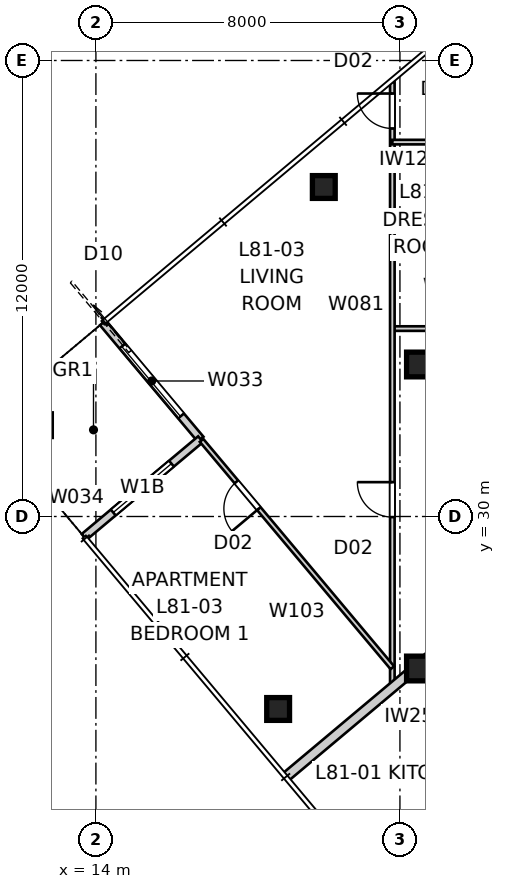
"""IFC4 building model, lengths in metres.
Left out: names, types, materials, properties, quantities, classifications, styles, units other than length and angle.
Written with IfcOpenShell. Run it as: python <this file> out.ifc"""

import sys

from ifc_helpers import new_model, si_unit, direction, frame, frame_2d, origin, origin_2d, place, context, subcontext, project, spatial, rectangle, extrude, element, fill, save


model = new_model("IFC4")
c1 = context("Model", 3, precision=1e-05, world=origin(), true_north=direction((0.0, 1.0)))
c2 = subcontext(c1, "Body", "Model", "MODEL_VIEW")
j1 = project(units=[si_unit("LENGTHUNIT", "METRE"), si_unit("PLANEANGLEUNIT", "RADIAN")], contexts=[c1])
p1 = place(None, origin())
s1 = spatial("IfcSite", under=j1, at=p1, CompositionType="ELEMENT")
p2 = place(p1, origin())
s2 = spatial("IfcBuilding", under=s1, at=p2, CompositionType="ELEMENT")
p3 = place(p2, frame((0.0, 0.0, 293.0)))
s3 = spatial("IfcBuildingStorey", under=s2, at=p3, CompositionType="ELEMENT", Elevation=293.0)
for number, where, z_axis, x_axis in (
    (1, (19.997, 38.671, 0.0), (0.0, 0.0, 1.0), (1.0, 0.0, 0.0)),
    (2, (18.795, 24.935, 0.0), (0.0, 0.0, 1.0), (1.0, 0.0, 0.0)),
):
    element("IfcColumn", number, at=place(p3, frame(where, z_axis=z_axis, x_axis=x_axis)), inside=s3, PredefinedType="COLUMN", context=c2, shape_type="SweptSolid", body=[
        extrude(rectangle(XDim=0.6, YDim=0.6, at=origin_2d()), origin(), (0.0, 0.0, 1.0), 3.4),
    ])
for number, where, z_axis, x_axis in (
    (3, (22.5, 34.0, 0.0), (0.0, 0.0, 1.0), (1.0, 0.0, 0.0)),
    (4, (22.5, 26.0, 0.0), (0.0, 0.0, 1.0), (1.0, 0.0, 0.0)),
):
    element("IfcColumn", number, at=place(p3, frame(where, z_axis=z_axis, x_axis=x_axis)), inside=s3, PredefinedType="COLUMN", context=c2, shape_type="SweptSolid", body=[
        extrude(rectangle(XDim=0.65, YDim=0.65, at=origin_2d()), origin(), (0.0, 0.0, 1.0), 3.4),
    ])
p4 = place(p3, frame((14.183, 35.098, 0.0), z_axis=(0.0, 0.0, 1.0), x_axis=(0.642768287094, -0.766060656284, 0.0)))
e5 = element("IfcWall", 5, at=p4, inside=s3, PredefinedType="SOLIDWALL", context=c2, shape_type="SweptSolid", body=[
    extrude(rectangle(XDim=4.0, YDim=0.2, at=frame_2d((2.0, 0.0))), origin(), (0.0, 0.0, 1.0), 3.25),
])
p5 = place(p4, frame((0.8, 0.0, 0.0)))
e6 = element("IfcOpeningElement", 6, at=p5, cuts=e5, PredefinedType="OPENING", context=c2, shape_type="SweptSolid", body=[
    extrude(rectangle(XDim=2.4, YDim=2.4, at=frame_2d((1.2, 1.2))), frame((0.0, 0.11, 0.0), z_axis=(0.0, -1.0, 0.0), x_axis=(1.0, 0.0, 0.0)), (0.0, 0.0, 1.0), 0.22),
])
p6 = place(p3, frame((16.754, 32.034, 0.0), z_axis=(0.0, 0.0, 1.0), x_axis=(-0.766035437498, -0.642798342015, 0.0)))
e7 = element("IfcWall", 7, at=p6, inside=s3, PredefinedType="SOLIDWALL", context=c2, shape_type="SweptSolid", body=[
    extrude(rectangle(XDim=4.0, YDim=0.2, at=frame_2d((2.0, 0.0))), origin(), (0.0, 0.0, 1.0), 3.25),
])
p7 = place(p6, frame((1.0, 0.0, 0.45)))
e8 = element("IfcOpeningElement", 8, at=p7, cuts=e7, PredefinedType="OPENING", context=c2, shape_type="SweptSolid", body=[
    extrude(rectangle(XDim=2.0, YDim=1.8, at=frame_2d((1.0, 0.9))), frame((0.0, 0.11, 0.0), z_axis=(0.0, -1.0, 0.0), x_axis=(1.0, 0.0, 0.0)), (0.0, 0.0, 1.0), 0.22),
])
p8 = place(p3, frame((18.993, 23.143, 0.0), z_axis=(0.0, 0.0, 1.0), x_axis=(0.766054150891, 0.642776040237, 0.0)))
e9 = element("IfcWall", 9, at=p8, inside=s3, PredefinedType="PARTITIONING", context=c2, shape_type="SweptSolid", body=[
    extrude(rectangle(XDim=7.254, YDim=0.25, at=frame_2d((3.627, 0.0))), origin(), (0.0, 0.0, 1.0), 3.25),
])
p9 = place(p3, frame((21.8, 34.945, 0.0), z_axis=(0.0, 0.0, 1.0), x_axis=(1.0, 0.0, 0.0)))
e10 = element("IfcWall", 10, at=p9, inside=s3, PredefinedType="PARTITIONING", context=c2, shape_type="SweptSolid", body=[
    extrude(rectangle(XDim=3.1, YDim=0.12, at=frame_2d((1.55, 0.0))), origin(), (0.0, 0.0, 1.0), 3.25),
])
p10 = place(p9, frame((1.09, 0.0, 0.0)))
e11 = element("IfcOpeningElement", 11, at=p10, cuts=e10, PredefinedType="OPENING", context=c2, shape_type="SweptSolid", body=[
    extrude(rectangle(XDim=0.92, YDim=2.34, at=frame_2d((0.46, 1.17))), frame((0.0, 0.07, 0.0), z_axis=(0.0, -1.0, 0.0), x_axis=(1.0, 0.0, 0.0)), (0.0, 0.0, 1.0), 0.14),
])
p11 = place(p3, frame((21.8, 25.498, 0.0), z_axis=(0.0, 0.0, 1.0), x_axis=(0.0, 1.0, 0.0)))
e12 = element("IfcWall", 12, at=p11, inside=s3, PredefinedType="PARTITIONING", context=c2, shape_type="SweptSolid", body=[
    extrude(rectangle(XDim=15.939, YDim=0.12, at=frame_2d((7.969, 0.0))), origin(), (0.0, 0.0, 1.0), 3.25),
])
p12 = place(p11, frame((4.486, 0.0, 0.0)))
e13 = element("IfcOpeningElement", 13, at=p12, cuts=e12, PredefinedType="OPENING", context=c2, shape_type="SweptSolid", body=[
    extrude(rectangle(XDim=0.92, YDim=2.34, at=frame_2d((0.46, 1.17))), frame((0.0, 0.07, 0.0), z_axis=(0.0, -1.0, 0.0), x_axis=(1.0, 0.0, 0.0)), (0.0, 0.0, 1.0), 0.14),
])
p13 = place(p11, frame((14.713, 0.0, 0.0)))
e14 = element("IfcOpeningElement", 14, at=p13, cuts=e12, PredefinedType="OPENING", context=c2, shape_type="SweptSolid", body=[
    extrude(rectangle(XDim=0.92, YDim=2.34, at=frame_2d((0.46, 1.17))), frame((0.0, 0.07, 0.0), z_axis=(0.0, -1.0, 0.0), x_axis=(1.0, 0.0, 0.0)), (0.0, 0.0, 1.0), 0.14),
])
p14 = place(p3, frame((24.9, 39.852, 0.0), z_axis=(0.0, 0.0, 1.0), x_axis=(-1.0, 0.0, 0.0)))
e15 = element("IfcWall", 15, at=p14, inside=s3, PredefinedType="PARTITIONING", context=c2, shape_type="SweptSolid", body=[
    extrude(rectangle(XDim=3.1, YDim=0.12, at=frame_2d((1.55, 0.0))), origin(), (0.0, 0.0, 1.0), 3.25),
])
p15 = place(p3, frame((21.8, 26.021, 0.0), z_axis=(0.0, 0.0, 1.0), x_axis=(-0.642785106342, 0.766046543668, 0.0)))
e16 = element("IfcWall", 16, at=p15, inside=s3, PredefinedType="PARTITIONING", context=c2, shape_type="SweptSolid", body=[
    extrude(rectangle(XDim=7.81, YDim=0.12, at=frame_2d((3.905, 0.0))), origin(), (0.0, 0.0, 1.0), 3.25),
])
p16 = place(p15, frame((5.465, 0.0, 0.0)))
e17 = element("IfcOpeningElement", 17, at=p16, cuts=e16, PredefinedType="OPENING", context=c2, shape_type="SweptSolid", body=[
    extrude(rectangle(XDim=0.92, YDim=2.34, at=frame_2d((0.46, 1.17))), frame((0.0, 0.07, 0.0), z_axis=(0.0, -1.0, 0.0), x_axis=(1.0, 0.0, 0.0)), (0.0, 0.0, 1.0), 0.14),
])
p17 = place(p5, origin())
e18 = element("IfcDoor", 18, at=p17, inside=s3, OperationType="SLIDING_TO_LEFT", PredefinedType="DOOR", context=c2, shape_type="SweptSolid", body=[
    extrude(rectangle(XDim=2.4, YDim=2.4, at=frame_2d((1.2, 1.2))), frame((0.0, 0.025, 0.0), z_axis=(0.0, -1.0, 0.0), x_axis=(1.0, 0.0, 0.0)), (0.0, 0.0, 1.0), 0.05),
])
fill(e6, e18)
p18 = place(p7, origin())
e19 = element("IfcWindow", 19, at=p18, inside=s3, PartitioningType="SINGLE_PANEL", PredefinedType="WINDOW", context=c2, shape_type="SweptSolid", body=[
    extrude(rectangle(XDim=2.0, YDim=1.8, at=frame_2d((1.0, 0.9))), frame((0.0, 0.03, 0.0), z_axis=(0.0, -1.0, 0.0), x_axis=(1.0, 0.0, 0.0)), (0.0, 0.0, 1.0), 0.06),
])
fill(e8, e19)
p19 = place(p12, origin())
e20 = element("IfcDoor", 20, at=p19, inside=s3, OperationType="SINGLE_SWING_RIGHT", PredefinedType="DOOR", context=c2, shape_type="SweptSolid", body=[
    extrude(rectangle(XDim=0.92, YDim=2.34, at=frame_2d((0.46, 1.17))), frame((0.0, 0.025, 0.0), z_axis=(0.0, -1.0, 0.0), x_axis=(1.0, 0.0, 0.0)), (0.0, 0.0, 1.0), 0.05),
])
fill(e13, e20)
p20 = place(p16, origin())
e21 = element("IfcDoor", 21, at=p20, inside=s3, OperationType="SINGLE_SWING_LEFT", PredefinedType="DOOR", context=c2, shape_type="SweptSolid", body=[
    extrude(rectangle(XDim=0.92, YDim=2.34, at=frame_2d((0.46, 1.17))), frame((0.0, 0.025, 0.0), z_axis=(0.0, -1.0, 0.0), x_axis=(1.0, 0.0, 0.0)), (0.0, 0.0, 1.0), 0.05),
])
fill(e17, e21)
p21 = place(p13, origin())
e22 = element("IfcDoor", 22, at=p21, inside=s3, OperationType="SINGLE_SWING_RIGHT", PredefinedType="DOOR", context=c2, shape_type="SweptSolid", body=[
    extrude(rectangle(XDim=0.92, YDim=2.34, at=frame_2d((0.46, 1.17))), frame((0.0, 0.025, 0.0), z_axis=(0.0, -1.0, 0.0), x_axis=(1.0, 0.0, 0.0)), (0.0, 0.0, 1.0), 0.05),
])
fill(e14, e22)
save(model, sys.argv[1])
